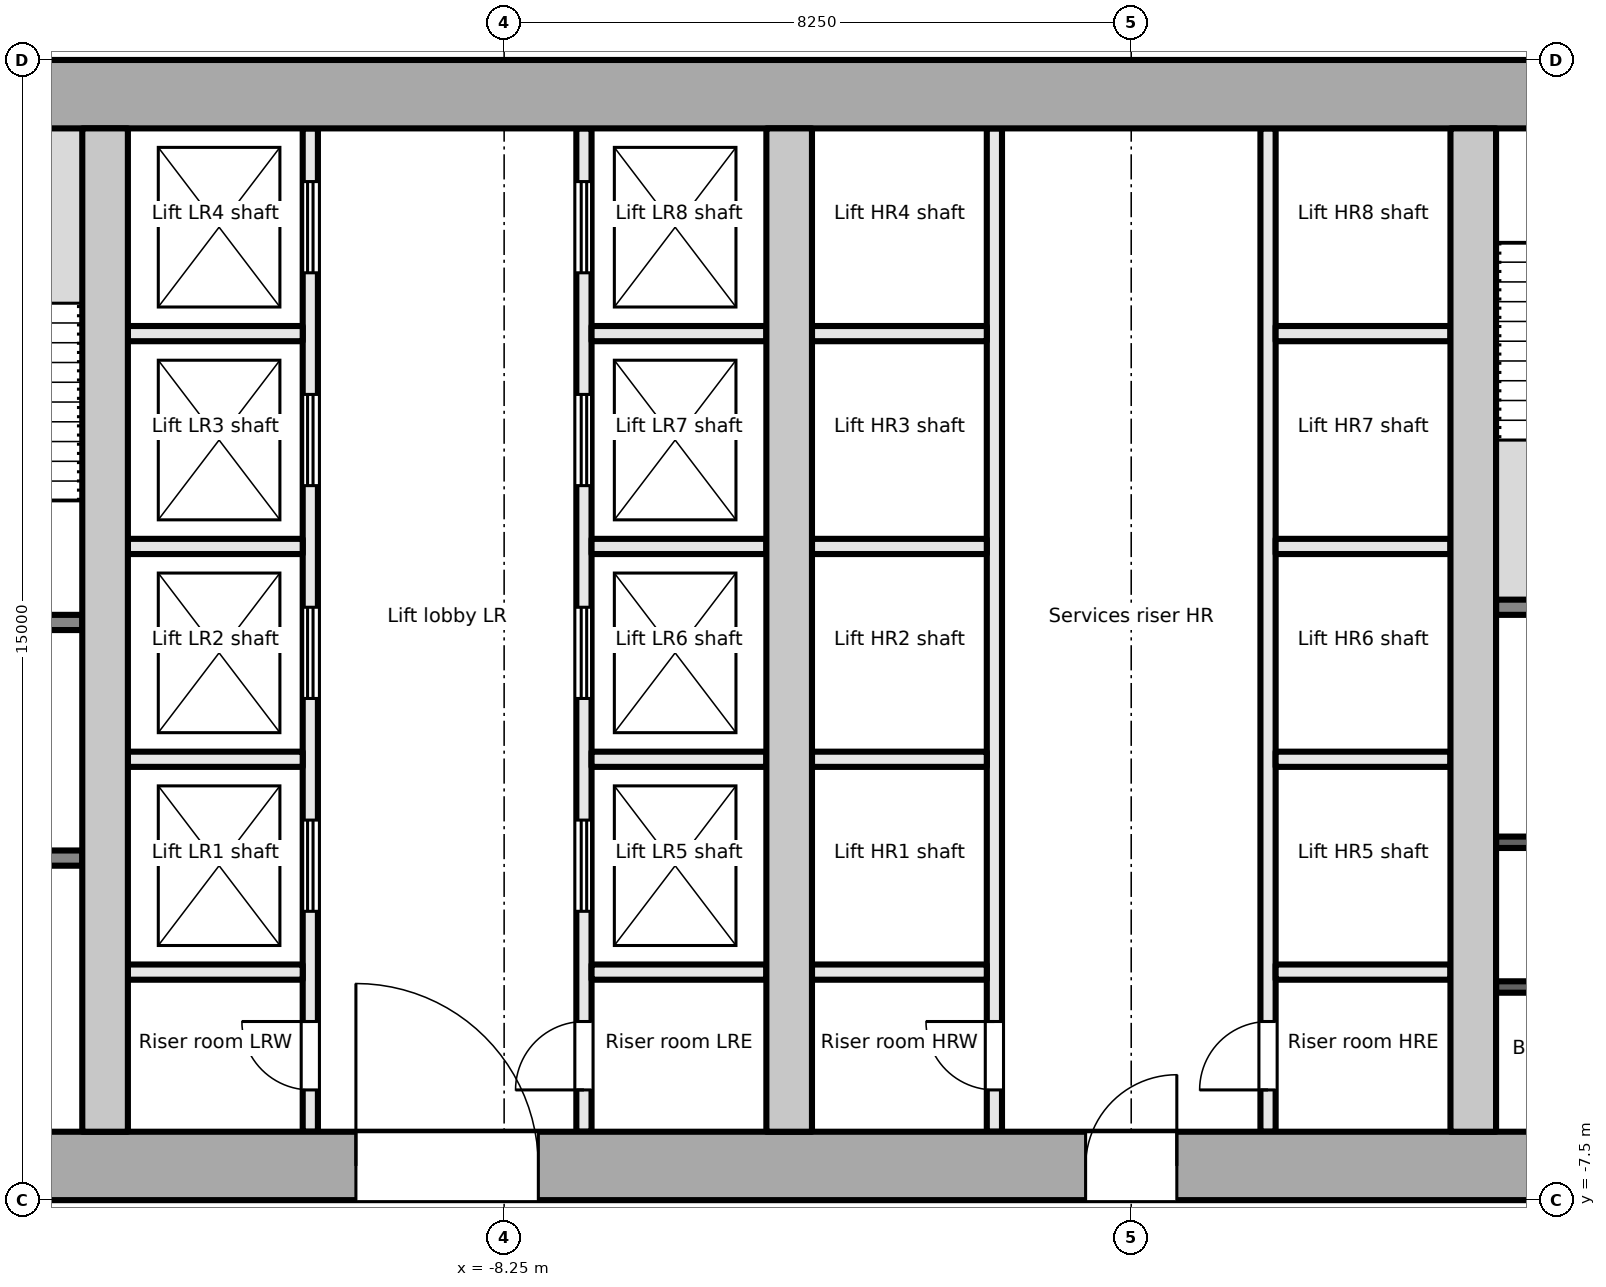
"""IFC4 building model, lengths in metres.
Left out: names, types, materials, properties, quantities, classifications, styles, units other than length and angle.
Written with IfcOpenShell. Run it as: python <this file> out.ifc"""

import sys

from ifc_helpers import new_model, si_unit, direction, frame, frame_2d, origin, place, context, subcontext, project, spatial, rectangle, extrude, element, fill, save


model = new_model("IFC4")
c1 = context("Model", 3, precision=1e-05, world=origin(), true_north=direction((0.0, 1.0)))
c2 = subcontext(c1, "Body", "Model", "MODEL_VIEW")
j1 = project(units=[si_unit("LENGTHUNIT", "METRE"), si_unit("PLANEANGLEUNIT", "RADIAN")], contexts=[c1])
p1 = place(None, origin())
s1 = spatial("IfcSite", under=j1, at=p1, CompositionType="ELEMENT")
p2 = place(p1, origin())
s2 = spatial("IfcBuilding", under=s1, at=p2, CompositionType="ELEMENT")
p3 = place(p2, frame((0.0, 0.0, 87.7)))
s3 = spatial("IfcBuildingStorey", under=s2, at=p3, CompositionType="ELEMENT", Elevation=87.7)
p4 = place(p3, frame((-18.0, -7.05, -0.2), z_axis=(0.0, 0.0, 1.0), x_axis=(1.0, 0.0, 0.0)))
e1 = element("IfcWall", 1, at=p4, inside=s3, PredefinedType="SHEAR", context=c2, shape_type="SweptSolid", body=[
    extrude(rectangle(XDim=36.0, YDim=0.9, at=frame_2d((18.0, 0.0))), origin(), (0.0, 0.0, 1.0), 4.0),
])
p5 = place(p4, frame((7.8, 0.0, 0.2)))
e2 = element("IfcOpeningElement", 2, at=p5, cuts=e1, PredefinedType="OPENING", context=c2, shape_type="SweptSolid", body=[
    extrude(rectangle(XDim=2.4, YDim=2.1, at=frame_2d((1.2, 1.05))), frame((0.0, 0.46, 0.0), z_axis=(0.0, -1.0, 0.0), x_axis=(1.0, 0.0, 0.0)), (0.0, 0.0, 1.0), 0.921),
])
p6 = place(p4, frame((17.4, 0.0, 0.2)))
e3 = element("IfcOpeningElement", 3, at=p6, cuts=e1, PredefinedType="OPENING", context=c2, shape_type="SweptSolid", body=[
    extrude(rectangle(XDim=1.2, YDim=2.1, at=frame_2d((0.6, 1.05))), frame((0.0, 0.46, 0.0), z_axis=(0.0, -1.0, 0.0), x_axis=(1.0, 0.0, 0.0)), (0.0, 0.0, 1.0), 0.921),
])
p7 = place(p4, frame((26.1, 0.0, 0.2)))
e4 = element("IfcOpeningElement", 4, at=p7, cuts=e1, PredefinedType="OPENING", context=c2, shape_type="SweptSolid", body=[
    extrude(rectangle(XDim=2.4, YDim=2.1, at=frame_2d((1.2, 1.05))), frame((0.0, 0.46, 0.0), z_axis=(0.0, -1.0, 0.0), x_axis=(1.0, 0.0, 0.0)), (0.0, 0.0, 1.0), 0.921),
])
p8 = place(p3, frame((-18.0, 7.05, -0.2), z_axis=(0.0, 0.0, 1.0), x_axis=(1.0, 0.0, 0.0)))
e5 = element("IfcWall", 5, at=p8, inside=s3, PredefinedType="SHEAR", context=c2, shape_type="SweptSolid", body=[
    extrude(rectangle(XDim=36.0, YDim=0.9, at=frame_2d((18.0, 0.0))), origin(), (0.0, 0.0, 1.0), 4.0),
])
for number, where, z_axis, x_axis in (
    (6, (-13.5, -6.6, -0.2), (0.0, 0.0, 1.0), (0.0, 1.0, 0.0)),
    (7, (-4.5, -6.6, -0.2), (0.0, 0.0, 1.0), (0.0, 1.0, 0.0)),
    (8, (4.5, -6.6, -0.2), (0.0, 0.0, 1.0), (0.0, 1.0, 0.0)),
):
    element("IfcWall", number, at=place(p3, frame(where, z_axis=z_axis, x_axis=x_axis)), inside=s3, PredefinedType="SHEAR", context=c2, shape_type="SweptSolid", body=[
        extrude(rectangle(XDim=13.2, YDim=0.6, at=frame_2d((6.6, 0.0))), origin(), (0.0, 0.0, 1.0), 4.0),
    ])
p9 = place(p3, frame((-17.1, -3.0, 0.0), z_axis=(0.0, 0.0, 1.0), x_axis=(1.0, 0.0, 0.0)))
e9 = element("IfcWall", 9, at=p9, inside=s3, PredefinedType="PARTITIONING", context=c2, shape_type="SweptSolid", body=[
    extrude(rectangle(XDim=3.3, YDim=0.2, at=frame_2d((1.65, 0.0))), origin(), (0.0, 0.0, 1.0), 3.8),
])
p10 = place(p9, frame((1.1, 0.0, 0.0)))
e10 = element("IfcOpeningElement", 10, at=p10, cuts=e9, PredefinedType="OPENING", context=c2, shape_type="SweptSolid", body=[
    extrude(rectangle(XDim=1.1, YDim=2.1, at=frame_2d((0.55, 1.05))), frame((0.0, 0.111, 0.0), z_axis=(0.0, -1.0, 0.0), x_axis=(1.0, 0.0, 0.0)), (0.0, 0.0, 1.0), 0.221),
])
p11 = place(p3, frame((-17.1, 0.1, 0.0), z_axis=(0.0, 0.0, 1.0), x_axis=(1.0, 0.0, 0.0)))
e11 = element("IfcWall", 11, at=p11, inside=s3, PredefinedType="PARTITIONING", context=c2, shape_type="SweptSolid", body=[
    extrude(rectangle(XDim=3.3, YDim=0.2, at=frame_2d((1.65, 0.0))), origin(), (0.0, 0.0, 1.0), 3.8),
])
p12 = place(p11, frame((1.1, 0.0, 0.0)))
e12 = element("IfcOpeningElement", 12, at=p12, cuts=e11, PredefinedType="OPENING", context=c2, shape_type="SweptSolid", body=[
    extrude(rectangle(XDim=1.1, YDim=2.1, at=frame_2d((0.55, 1.05))), frame((0.0, 0.111, 0.0), z_axis=(0.0, -1.0, 0.0), x_axis=(1.0, 0.0, 0.0)), (0.0, 0.0, 1.0), 0.221),
])
p13 = place(p3, frame((-10.8, -6.6, 0.0), z_axis=(0.0, 0.0, 1.0), x_axis=(0.0, 1.0, 0.0)))
e13 = element("IfcWall", 13, at=p13, inside=s3, PredefinedType="PARTITIONING", context=c2, shape_type="SweptSolid", body=[
    extrude(rectangle(XDim=13.2, YDim=0.2, at=frame_2d((6.6, 0.0))), origin(), (0.0, 0.0, 1.0), 3.8),
])
p14 = place(p13, frame((0.55, 0.0, 0.0)))
e14 = element("IfcOpeningElement", 14, at=p14, cuts=e13, PredefinedType="OPENING", context=c2, shape_type="SweptSolid", body=[
    extrude(rectangle(XDim=0.9, YDim=2.1, at=frame_2d((0.45, 1.05))), frame((0.0, 0.111, 0.0), z_axis=(0.0, -1.0, 0.0), x_axis=(1.0, 0.0, 0.0)), (0.0, 0.0, 1.0), 0.221),
])
p15 = place(p13, frame((2.9, 0.0, 0.0)))
e15 = element("IfcOpeningElement", 15, at=p15, cuts=e13, PredefinedType="OPENING", context=c2, shape_type="SweptSolid", body=[
    extrude(rectangle(XDim=1.2, YDim=2.1, at=frame_2d((0.6, 1.05))), frame((0.0, 0.111, 0.0), z_axis=(0.0, -1.0, 0.0), x_axis=(1.0, 0.0, 0.0)), (0.0, 0.0, 1.0), 0.221),
])
p16 = place(p13, frame((5.7, 0.0, 0.0)))
e16 = element("IfcOpeningElement", 16, at=p16, cuts=e13, PredefinedType="OPENING", context=c2, shape_type="SweptSolid", body=[
    extrude(rectangle(XDim=1.2, YDim=2.1, at=frame_2d((0.6, 1.05))), frame((0.0, 0.111, 0.0), z_axis=(0.0, -1.0, 0.0), x_axis=(1.0, 0.0, 0.0)), (0.0, 0.0, 1.0), 0.221),
])
p17 = place(p13, frame((8.5, 0.0, 0.0)))
e17 = element("IfcOpeningElement", 17, at=p17, cuts=e13, PredefinedType="OPENING", context=c2, shape_type="SweptSolid", body=[
    extrude(rectangle(XDim=1.2, YDim=2.1, at=frame_2d((0.6, 1.05))), frame((0.0, 0.111, 0.0), z_axis=(0.0, -1.0, 0.0), x_axis=(1.0, 0.0, 0.0)), (0.0, 0.0, 1.0), 0.221),
])
p18 = place(p13, frame((11.3, 0.0, 0.0)))
e18 = element("IfcOpeningElement", 18, at=p18, cuts=e13, PredefinedType="OPENING", context=c2, shape_type="SweptSolid", body=[
    extrude(rectangle(XDim=1.2, YDim=2.1, at=frame_2d((0.6, 1.05))), frame((0.0, 0.111, 0.0), z_axis=(0.0, -1.0, 0.0), x_axis=(1.0, 0.0, 0.0)), (0.0, 0.0, 1.0), 0.221),
])
p19 = place(p3, frame((-7.2, -6.6, 0.0), z_axis=(0.0, 0.0, 1.0), x_axis=(0.0, 1.0, 0.0)))
e19 = element("IfcWall", 19, at=p19, inside=s3, PredefinedType="PARTITIONING", context=c2, shape_type="SweptSolid", body=[
    extrude(rectangle(XDim=13.2, YDim=0.2, at=frame_2d((6.6, 0.0))), origin(), (0.0, 0.0, 1.0), 3.8),
])
p20 = place(p19, frame((0.55, 0.0, 0.0)))
e20 = element("IfcOpeningElement", 20, at=p20, cuts=e19, PredefinedType="OPENING", context=c2, shape_type="SweptSolid", body=[
    extrude(rectangle(XDim=0.9, YDim=2.1, at=frame_2d((0.45, 1.05))), frame((0.0, 0.111, 0.0), z_axis=(0.0, -1.0, 0.0), x_axis=(1.0, 0.0, 0.0)), (0.0, 0.0, 1.0), 0.221),
])
p21 = place(p19, frame((2.9, 0.0, 0.0)))
e21 = element("IfcOpeningElement", 21, at=p21, cuts=e19, PredefinedType="OPENING", context=c2, shape_type="SweptSolid", body=[
    extrude(rectangle(XDim=1.2, YDim=2.1, at=frame_2d((0.6, 1.05))), frame((0.0, 0.111, 0.0), z_axis=(0.0, -1.0, 0.0), x_axis=(1.0, 0.0, 0.0)), (0.0, 0.0, 1.0), 0.221),
])
p22 = place(p19, frame((5.7, 0.0, 0.0)))
e22 = element("IfcOpeningElement", 22, at=p22, cuts=e19, PredefinedType="OPENING", context=c2, shape_type="SweptSolid", body=[
    extrude(rectangle(XDim=1.2, YDim=2.1, at=frame_2d((0.6, 1.05))), frame((0.0, 0.111, 0.0), z_axis=(0.0, -1.0, 0.0), x_axis=(1.0, 0.0, 0.0)), (0.0, 0.0, 1.0), 0.221),
])
p23 = place(p19, frame((8.5, 0.0, 0.0)))
e23 = element("IfcOpeningElement", 23, at=p23, cuts=e19, PredefinedType="OPENING", context=c2, shape_type="SweptSolid", body=[
    extrude(rectangle(XDim=1.2, YDim=2.1, at=frame_2d((0.6, 1.05))), frame((0.0, 0.111, 0.0), z_axis=(0.0, -1.0, 0.0), x_axis=(1.0, 0.0, 0.0)), (0.0, 0.0, 1.0), 0.221),
])
p24 = place(p19, frame((11.3, 0.0, 0.0)))
e24 = element("IfcOpeningElement", 24, at=p24, cuts=e19, PredefinedType="OPENING", context=c2, shape_type="SweptSolid", body=[
    extrude(rectangle(XDim=1.2, YDim=2.1, at=frame_2d((0.6, 1.05))), frame((0.0, 0.111, 0.0), z_axis=(0.0, -1.0, 0.0), x_axis=(1.0, 0.0, 0.0)), (0.0, 0.0, 1.0), 0.221),
])
for number, where, z_axis, x_axis in (
    (25, (-13.2, -1.7, 0.0), (0.0, 0.0, 1.0), (1.0, 0.0, 0.0)),
    (26, (-13.2, 1.1, 0.0), (0.0, 0.0, 1.0), (1.0, 0.0, 0.0)),
    (27, (-13.2, 3.9, 0.0), (0.0, 0.0, 1.0), (1.0, 0.0, 0.0)),
    (28, (-13.2, -4.5, 0.0), (0.0, 0.0, 1.0), (1.0, 0.0, 0.0)),
    (29, (-7.1, -1.7, 0.0), (0.0, 0.0, 1.0), (1.0, 0.0, 0.0)),
    (30, (-7.1, 1.1, 0.0), (0.0, 0.0, 1.0), (1.0, 0.0, 0.0)),
    (31, (-7.1, 3.9, 0.0), (0.0, 0.0, 1.0), (1.0, 0.0, 0.0)),
    (32, (-7.1, -4.5, 0.0), (0.0, 0.0, 1.0), (1.0, 0.0, 0.0)),
):
    element("IfcWall", number, at=place(p3, frame(where, z_axis=z_axis, x_axis=x_axis)), inside=s3, PredefinedType="PARTITIONING", context=c2, shape_type="SweptSolid", body=[
        extrude(rectangle(XDim=2.3, YDim=0.2, at=frame_2d((1.15, 0.0))), origin(), (0.0, 0.0, 1.0), 3.8),
    ])
p25 = place(p3, frame((-1.8, -6.6, 0.0), z_axis=(0.0, 0.0, 1.0), x_axis=(0.0, 1.0, 0.0)))
e33 = element("IfcWall", 33, at=p25, inside=s3, PredefinedType="PARTITIONING", context=c2, shape_type="SweptSolid", body=[
    extrude(rectangle(XDim=13.2, YDim=0.2, at=frame_2d((6.6, 0.0))), origin(), (0.0, 0.0, 1.0), 3.8),
])
p26 = place(p25, frame((0.55, 0.0, 0.0)))
e34 = element("IfcOpeningElement", 34, at=p26, cuts=e33, PredefinedType="OPENING", context=c2, shape_type="SweptSolid", body=[
    extrude(rectangle(XDim=0.9, YDim=2.1, at=frame_2d((0.45, 1.05))), frame((0.0, 0.111, 0.0), z_axis=(0.0, -1.0, 0.0), x_axis=(1.0, 0.0, 0.0)), (0.0, 0.0, 1.0), 0.221),
])
p27 = place(p3, frame((1.8, -6.6, 0.0), z_axis=(0.0, 0.0, 1.0), x_axis=(0.0, 1.0, 0.0)))
e35 = element("IfcWall", 35, at=p27, inside=s3, PredefinedType="PARTITIONING", context=c2, shape_type="SweptSolid", body=[
    extrude(rectangle(XDim=13.2, YDim=0.2, at=frame_2d((6.6, 0.0))), origin(), (0.0, 0.0, 1.0), 3.8),
])
p28 = place(p27, frame((0.55, 0.0, 0.0)))
e36 = element("IfcOpeningElement", 36, at=p28, cuts=e35, PredefinedType="OPENING", context=c2, shape_type="SweptSolid", body=[
    extrude(rectangle(XDim=0.9, YDim=2.1, at=frame_2d((0.45, 1.05))), frame((0.0, 0.111, 0.0), z_axis=(0.0, -1.0, 0.0), x_axis=(1.0, 0.0, 0.0)), (0.0, 0.0, 1.0), 0.221),
])
for number, where, z_axis, x_axis in (
    (37, (-4.2, -1.7, 0.0), (0.0, 0.0, 1.0), (1.0, 0.0, 0.0)),
    (38, (-4.2, 1.1, 0.0), (0.0, 0.0, 1.0), (1.0, 0.0, 0.0)),
    (39, (-4.2, 3.9, 0.0), (0.0, 0.0, 1.0), (1.0, 0.0, 0.0)),
    (40, (-4.2, -4.5, 0.0), (0.0, 0.0, 1.0), (1.0, 0.0, 0.0)),
    (41, (1.9, -1.7, 0.0), (0.0, 0.0, 1.0), (1.0, 0.0, 0.0)),
    (42, (1.9, 1.1, 0.0), (0.0, 0.0, 1.0), (1.0, 0.0, 0.0)),
    (43, (1.9, 3.9, 0.0), (0.0, 0.0, 1.0), (1.0, 0.0, 0.0)),
    (44, (1.9, -4.5, 0.0), (0.0, 0.0, 1.0), (1.0, 0.0, 0.0)),
):
    element("IfcWall", number, at=place(p3, frame(where, z_axis=z_axis, x_axis=x_axis)), inside=s3, PredefinedType="PARTITIONING", context=c2, shape_type="SweptSolid", body=[
        extrude(rectangle(XDim=2.3, YDim=0.2, at=frame_2d((1.15, 0.0))), origin(), (0.0, 0.0, 1.0), 3.8),
    ])
p29 = place(p3, frame((4.8, 0.3, 0.0), z_axis=(0.0, 0.0, 1.0), x_axis=(1.0, 0.0, 0.0)))
e45 = element("IfcWall", 45, at=p29, inside=s3, PredefinedType="PARTITIONING", context=c2, shape_type="SweptSolid", body=[
    extrude(rectangle(XDim=3.15, YDim=0.2, at=frame_2d((1.575, 0.0))), origin(), (0.0, 0.0, 1.0), 3.8),
])
for number, where, z_axis, x_axis in (
    (46, (4.8, -4.696, 0.0), (0.0, 0.0, 1.0), (1.0, 0.0, 0.0)),
    (47, (4.8, -2.792, 0.0), (0.0, 0.0, 1.0), (1.0, 0.0, 0.0)),
):
    element("IfcWall", number, at=place(p3, frame(where, z_axis=z_axis, x_axis=x_axis)), inside=s3, PredefinedType="PARTITIONING", context=c2, shape_type="SweptSolid", body=[
        extrude(rectangle(XDim=3.15, YDim=0.15, at=frame_2d((1.575, 0.0))), origin(), (0.0, 0.0, 1.0), 3.8),
    ])
p30 = place(p14, origin())
e48 = element("IfcDoor", 48, at=p30, inside=s3, OperationType="SINGLE_SWING_RIGHT", PredefinedType="DOOR", context=c2, shape_type="SweptSolid", body=[
    extrude(rectangle(XDim=0.9, YDim=2.1, at=frame_2d((0.45, 1.05))), frame((0.0, 0.025, 0.0), z_axis=(0.0, -1.0, 0.0), x_axis=(1.0, 0.0, 0.0)), (0.0, 0.0, 1.0), 0.05),
])
fill(e14, e48)
p31 = place(p15, origin())
e49 = element("IfcDoor", 49, at=p31, inside=s3, OperationType="DOUBLE_DOOR_SLIDING", PredefinedType="DOOR", context=c2, shape_type="SweptSolid", body=[
    extrude(rectangle(XDim=1.2, YDim=2.1, at=frame_2d((0.6, 1.05))), frame((0.0, 0.025, 0.0), z_axis=(0.0, -1.0, 0.0), x_axis=(1.0, 0.0, 0.0)), (0.0, 0.0, 1.0), 0.05),
])
fill(e15, e49)
p32 = place(p16, origin())
e50 = element("IfcDoor", 50, at=p32, inside=s3, OperationType="DOUBLE_DOOR_SLIDING", PredefinedType="DOOR", context=c2, shape_type="SweptSolid", body=[
    extrude(rectangle(XDim=1.2, YDim=2.1, at=frame_2d((0.6, 1.05))), frame((0.0, 0.025, 0.0), z_axis=(0.0, -1.0, 0.0), x_axis=(1.0, 0.0, 0.0)), (0.0, 0.0, 1.0), 0.05),
])
fill(e16, e50)
p33 = place(p17, origin())
e51 = element("IfcDoor", 51, at=p33, inside=s3, OperationType="DOUBLE_DOOR_SLIDING", PredefinedType="DOOR", context=c2, shape_type="SweptSolid", body=[
    extrude(rectangle(XDim=1.2, YDim=2.1, at=frame_2d((0.6, 1.05))), frame((0.0, 0.025, 0.0), z_axis=(0.0, -1.0, 0.0), x_axis=(1.0, 0.0, 0.0)), (0.0, 0.0, 1.0), 0.05),
])
fill(e17, e51)
p34 = place(p18, origin())
e52 = element("IfcDoor", 52, at=p34, inside=s3, OperationType="DOUBLE_DOOR_SLIDING", PredefinedType="DOOR", context=c2, shape_type="SweptSolid", body=[
    extrude(rectangle(XDim=1.2, YDim=2.1, at=frame_2d((0.6, 1.05))), frame((0.0, 0.025, 0.0), z_axis=(0.0, -1.0, 0.0), x_axis=(1.0, 0.0, 0.0)), (0.0, 0.0, 1.0), 0.05),
])
fill(e18, e52)
p35 = place(p20, origin())
e53 = element("IfcDoor", 53, at=p35, inside=s3, OperationType="SINGLE_SWING_LEFT", PredefinedType="DOOR", context=c2, shape_type="SweptSolid", body=[
    extrude(rectangle(XDim=0.9, YDim=2.1, at=frame_2d((0.45, 1.05))), frame((0.0, 0.025, 0.0), z_axis=(0.0, -1.0, 0.0), x_axis=(1.0, 0.0, 0.0)), (0.0, 0.0, 1.0), 0.05),
])
fill(e20, e53)
p36 = place(p21, origin())
e54 = element("IfcDoor", 54, at=p36, inside=s3, OperationType="DOUBLE_DOOR_SLIDING", PredefinedType="DOOR", context=c2, shape_type="SweptSolid", body=[
    extrude(rectangle(XDim=1.2, YDim=2.1, at=frame_2d((0.6, 1.05))), frame((0.0, 0.025, 0.0), z_axis=(0.0, -1.0, 0.0), x_axis=(1.0, 0.0, 0.0)), (0.0, 0.0, 1.0), 0.05),
])
fill(e21, e54)
p37 = place(p22, origin())
e55 = element("IfcDoor", 55, at=p37, inside=s3, OperationType="DOUBLE_DOOR_SLIDING", PredefinedType="DOOR", context=c2, shape_type="SweptSolid", body=[
    extrude(rectangle(XDim=1.2, YDim=2.1, at=frame_2d((0.6, 1.05))), frame((0.0, 0.025, 0.0), z_axis=(0.0, -1.0, 0.0), x_axis=(1.0, 0.0, 0.0)), (0.0, 0.0, 1.0), 0.05),
])
fill(e22, e55)
p38 = place(p23, origin())
e56 = element("IfcDoor", 56, at=p38, inside=s3, OperationType="DOUBLE_DOOR_SLIDING", PredefinedType="DOOR", context=c2, shape_type="SweptSolid", body=[
    extrude(rectangle(XDim=1.2, YDim=2.1, at=frame_2d((0.6, 1.05))), frame((0.0, 0.025, 0.0), z_axis=(0.0, -1.0, 0.0), x_axis=(1.0, 0.0, 0.0)), (0.0, 0.0, 1.0), 0.05),
])
fill(e23, e56)
p39 = place(p24, origin())
e57 = element("IfcDoor", 57, at=p39, inside=s3, OperationType="DOUBLE_DOOR_SLIDING", PredefinedType="DOOR", context=c2, shape_type="SweptSolid", body=[
    extrude(rectangle(XDim=1.2, YDim=2.1, at=frame_2d((0.6, 1.05))), frame((0.0, 0.025, 0.0), z_axis=(0.0, -1.0, 0.0), x_axis=(1.0, 0.0, 0.0)), (0.0, 0.0, 1.0), 0.05),
])
fill(e24, e57)
p40 = place(p5, origin())
e58 = element("IfcDoor", 58, at=p40, inside=s3, OperationType="DOUBLE_DOOR_DOUBLE_SWING", PredefinedType="DOOR", context=c2, shape_type="SweptSolid", body=[
    extrude(rectangle(XDim=2.4, YDim=2.1, at=frame_2d((1.2, 1.05))), frame((0.0, 0.025, 0.0), z_axis=(0.0, -1.0, 0.0), x_axis=(1.0, 0.0, 0.0)), (0.0, 0.0, 1.0), 0.05),
])
fill(e2, e58)
p41 = place(p26, origin())
e59 = element("IfcDoor", 59, at=p41, inside=s3, OperationType="SINGLE_SWING_RIGHT", PredefinedType="DOOR", context=c2, shape_type="SweptSolid", body=[
    extrude(rectangle(XDim=0.9, YDim=2.1, at=frame_2d((0.45, 1.05))), frame((0.0, 0.025, 0.0), z_axis=(0.0, -1.0, 0.0), x_axis=(1.0, 0.0, 0.0)), (0.0, 0.0, 1.0), 0.05),
])
fill(e34, e59)
p42 = place(p28, origin())
e60 = element("IfcDoor", 60, at=p42, inside=s3, OperationType="SINGLE_SWING_LEFT", PredefinedType="DOOR", context=c2, shape_type="SweptSolid", body=[
    extrude(rectangle(XDim=0.9, YDim=2.1, at=frame_2d((0.45, 1.05))), frame((0.0, 0.025, 0.0), z_axis=(0.0, -1.0, 0.0), x_axis=(1.0, 0.0, 0.0)), (0.0, 0.0, 1.0), 0.05),
])
fill(e36, e60)
p43 = place(p6, origin())
e61 = element("IfcDoor", 61, at=p43, inside=s3, OperationType="SINGLE_SWING_RIGHT", PredefinedType="DOOR", context=c2, shape_type="SweptSolid", body=[
    extrude(rectangle(XDim=1.2, YDim=2.1, at=frame_2d((0.6, 1.05))), frame((0.0, 0.025, 0.0), z_axis=(0.0, -1.0, 0.0), x_axis=(1.0, 0.0, 0.0)), (0.0, 0.0, 1.0), 0.05),
])
fill(e3, e61)
save(model, sys.argv[1])
